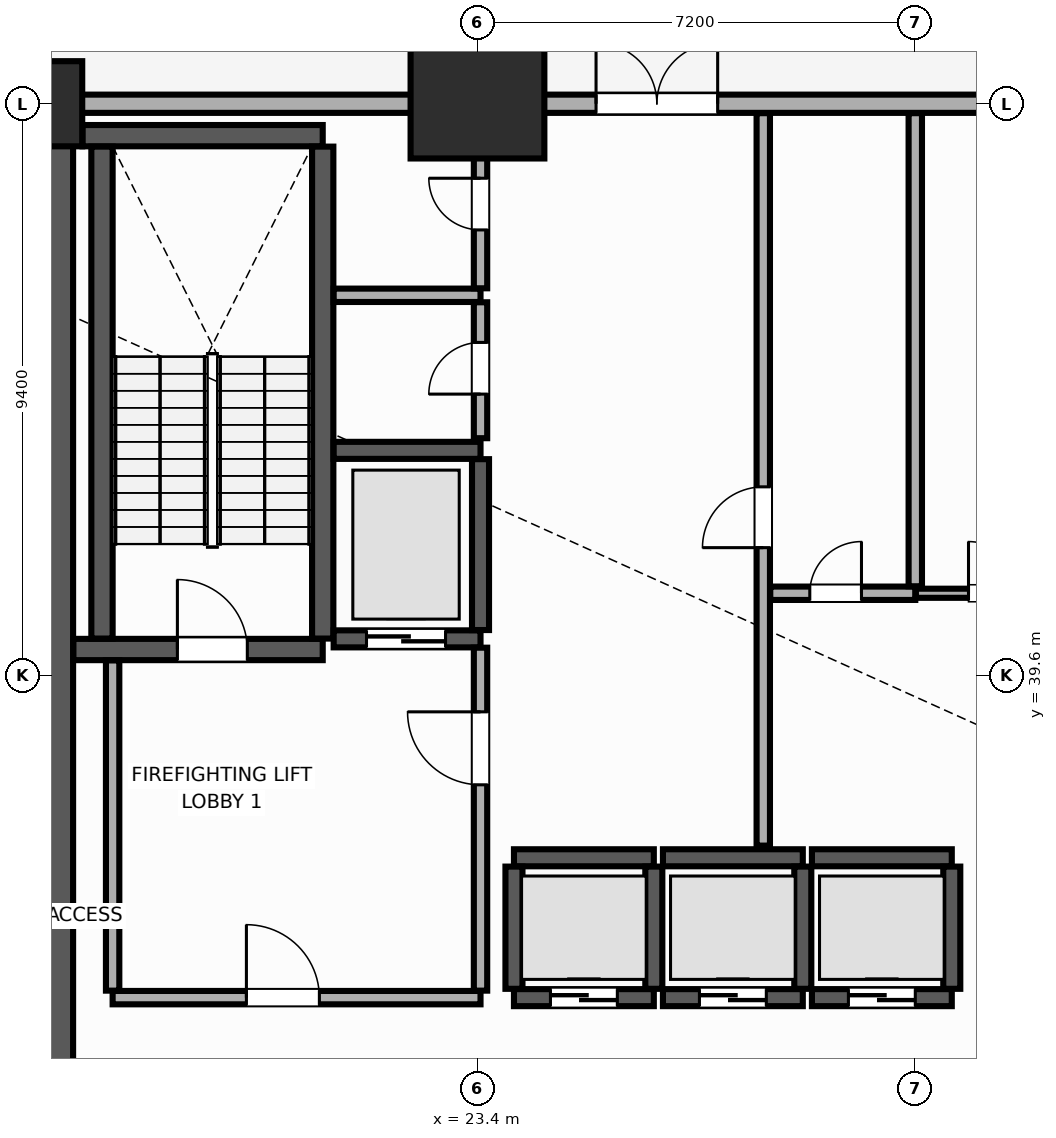
"""IFC4 building model, lengths in metres.
Left out: names, types, materials, properties, quantities, classifications, styles, units other than length and angle.
Written with IfcOpenShell. Run it as: python <this file> out.ifc"""

import sys

from ifc_helpers import new_model, si_unit, direction, frame, frame_2d, origin, origin_2d, place, context, subcontext, project, spatial, rectangle, extrude, element, fill, save


model = new_model("IFC4")
c1 = context("Model", 3, precision=1e-05, world=origin(), true_north=direction((0.0, 1.0)))
c2 = subcontext(c1, "Body", "Model", "MODEL_VIEW")
j1 = project(units=[si_unit("LENGTHUNIT", "METRE"), si_unit("PLANEANGLEUNIT", "RADIAN")], contexts=[c1])
p1 = place(None, origin())
s1 = spatial("IfcSite", under=j1, at=p1, CompositionType="ELEMENT")
p2 = place(p1, origin())
s2 = spatial("IfcBuilding", under=s1, at=p2, CompositionType="ELEMENT")
p3 = place(p2, origin())
s3 = spatial("IfcBuildingStorey", under=s2, at=p3, CompositionType="ELEMENT", Elevation=0.0)
p4 = place(p3, frame((23.4, 49.0, 0.0), z_axis=(0.0, 0.0, 1.0), x_axis=(1.0, 0.0, 0.0)))
e1 = element("IfcColumn", 1, at=p4, inside=s3, PredefinedType="USERDEFINED", context=c2, shape_type="SweptSolid", body=[
    extrude(rectangle(XDim=2.2, YDim=1.8, at=origin_2d()), origin(), (0.0, 0.0, 1.0), 7.68),
])
p5 = place(p3, frame((16.2, 49.0, 0.0), z_axis=(0.0, 0.0, 1.0), x_axis=(1.0, 0.0, 0.0)))
e2 = element("IfcColumn", 2, at=p5, inside=s3, PredefinedType="COLUMN", context=c2, shape_type="SweptSolid", body=[
    extrude(rectangle(XDim=1.4, YDim=1.4, at=origin_2d()), origin(), (0.0, 0.0, 1.0), 7.68),
])
p6 = place(p3, frame((73.5, 49.0, 0.0), z_axis=(0.0, 0.0, 1.0), x_axis=(-1.0, 0.0, 0.0)))
e3 = element("IfcWall", 3, at=p6, inside=s3, PredefinedType="SOLIDWALL", context=c2, shape_type="SweptSolid", body=[
    extrude(rectangle(XDim=63.0, YDim=0.3, at=frame_2d((31.5, 0.0))), origin(), (0.0, 0.0, 1.0), 5.4),
])
p7 = place(p6, frame((46.15, 0.0, 0.0)))
e4 = element("IfcOpeningElement", 4, at=p7, cuts=e3, PredefinedType="OPENING", context=c2, shape_type="SweptSolid", body=[
    extrude(rectangle(XDim=2.0, YDim=2.4, at=frame_2d((1.0, 1.2))), frame((0.0, 0.16, 0.0), z_axis=(0.0, -1.0, 0.0), x_axis=(1.0, 0.0, 0.0)), (0.0, 0.0, 1.0), 0.32),
])
p8 = place(p6, frame((37.6, 0.0, 0.0)))
e5 = element("IfcOpeningElement", 5, at=p8, cuts=e3, PredefinedType="OPENING", context=c2, shape_type="SweptSolid", body=[
    extrude(rectangle(XDim=2.0, YDim=2.4, at=frame_2d((1.0, 1.2))), frame((0.0, 0.16, 0.0), z_axis=(0.0, -1.0, 0.0), x_axis=(1.0, 0.0, 0.0)), (0.0, 0.0, 1.0), 0.32),
])
p9 = place(p6, frame((16.65, 0.0, 0.0)))
e6 = element("IfcOpeningElement", 6, at=p9, cuts=e3, PredefinedType="OPENING", context=c2, shape_type="SweptSolid", body=[
    extrude(rectangle(XDim=2.0, YDim=2.4, at=frame_2d((1.0, 1.2))), frame((0.0, 0.16, 0.0), z_axis=(0.0, -1.0, 0.0), x_axis=(1.0, 0.0, 0.0)), (0.0, 0.0, 1.0), 0.32),
])
p10 = place(p3, frame((16.2, 29.4, 0.0), z_axis=(0.0, 0.0, 1.0), x_axis=(0.0, 1.0, 0.0)))
e7 = element("IfcWall", 7, at=p10, inside=s3, PredefinedType="SHEAR", context=c2, shape_type="SweptSolid", body=[
    extrude(rectangle(XDim=19.2, YDim=1.1, at=frame_2d((9.6, 0.0))), origin(), (0.0, 0.0, 1.0), 7.68),
])
p11 = place(p3, frame((16.755, 40.025, 0.0), z_axis=(0.0, 0.0, 1.0), x_axis=(1.0, 0.0, 0.0)))
e8 = element("IfcWall", 8, at=p11, inside=s3, PredefinedType="SHEAR", context=c2, shape_type="SweptSolid", body=[
    extrude(rectangle(XDim=4.1, YDim=0.35, at=frame_2d((2.05, 0.0))), origin(), (0.0, 0.0, 1.0), 7.68),
])
p12 = place(p11, frame((1.71, 0.0, 0.0)))
e9 = element("IfcOpeningElement", 9, at=p12, cuts=e8, PredefinedType="OPENING", context=c2, shape_type="SweptSolid", body=[
    extrude(rectangle(XDim=1.15, YDim=2.15, at=frame_2d((0.575, 1.075))), frame((0.0, 0.185, 0.0), z_axis=(0.0, -1.0, 0.0), x_axis=(1.0, 0.0, 0.0)), (0.0, 0.0, 1.0), 0.37),
])
p13 = place(p3, frame((16.905, 48.475, 0.0), z_axis=(0.0, 0.0, 1.0), x_axis=(1.0, 0.0, 0.0)))
e10 = element("IfcWall", 10, at=p13, inside=s3, PredefinedType="SHEAR", context=c2, shape_type="SweptSolid", body=[
    extrude(rectangle(XDim=3.95, YDim=0.35, at=frame_2d((1.975, 0.0))), origin(), (0.0, 0.0, 1.0), 7.68),
])
for number, where, z_axis, x_axis in (
    (11, (17.225, 40.205, 0.0), (0.0, 0.0, 1.0), (0.0, 1.0, 0.0)),
    (12, (20.855, 40.205, 0.0), (0.0, 0.0, 1.0), (0.0, 1.0, 0.0)),
):
    element("IfcWall", number, at=place(p3, frame(where, z_axis=z_axis, x_axis=x_axis)), inside=s3, PredefinedType="SHEAR", context=c2, shape_type="SweptSolid", body=[
        extrude(rectangle(XDim=8.09, YDim=0.35, at=frame_2d((4.045, 0.0))), origin(), (0.0, 0.0, 1.0), 7.68),
    ])
p14 = place(p3, frame((24.0, 34.3, 0.0), z_axis=(0.0, 0.0, 1.0), x_axis=(1.0, 0.0, 0.0)))
e13 = element("IfcWall", 13, at=p14, inside=s3, PredefinedType="SHEAR", context=c2, shape_type="SweptSolid", body=[
    extrude(rectangle(XDim=2.3, YDim=0.28, at=frame_2d((1.15, 0.0))), origin(), (0.0, 0.0, 1.0), 7.68),
])
p15 = place(p14, frame((0.6, 0.0, 0.0)))
e14 = element("IfcOpeningElement", 14, at=p15, cuts=e13, PredefinedType="OPENING", context=c2, shape_type="SweptSolid", body=[
    extrude(rectangle(XDim=1.1, YDim=2.2, at=frame_2d((0.55, 1.1))), frame((0.0, 0.15, 0.0), z_axis=(0.0, -1.0, 0.0), x_axis=(1.0, 0.0, 0.0)), (0.0, 0.0, 1.0), 0.3),
])
p16 = place(p3, frame((24.0, 36.6, 0.0), z_axis=(0.0, 0.0, 1.0), x_axis=(1.0, 0.0, 0.0)))
e15 = element("IfcWall", 15, at=p16, inside=s3, PredefinedType="SHEAR", context=c2, shape_type="SweptSolid", body=[
    extrude(rectangle(XDim=2.3, YDim=0.28, at=frame_2d((1.15, 0.0))), origin(), (0.0, 0.0, 1.0), 7.68),
])
for number, where, z_axis, x_axis in (
    (16, (24.0, 34.445, 0.0), (0.0, 0.0, 1.0), (0.0, 1.0, 0.0)),
    (17, (26.3, 34.445, 0.0), (0.0, 0.0, 1.0), (0.0, 1.0, 0.0)),
):
    element("IfcWall", number, at=place(p3, frame(where, z_axis=z_axis, x_axis=x_axis)), inside=s3, PredefinedType="SHEAR", context=c2, shape_type="SweptSolid", body=[
        extrude(rectangle(XDim=2.01, YDim=0.28, at=frame_2d((1.005, 0.0))), origin(), (0.0, 0.0, 1.0), 7.68),
    ])
p17 = place(p3, frame((26.45, 34.3, 0.0), z_axis=(0.0, 0.0, 1.0), x_axis=(1.0, 0.0, 0.0)))
e18 = element("IfcWall", 18, at=p17, inside=s3, PredefinedType="SHEAR", context=c2, shape_type="SweptSolid", body=[
    extrude(rectangle(XDim=2.3, YDim=0.28, at=frame_2d((1.15, 0.0))), origin(), (0.0, 0.0, 1.0), 7.68),
])
p18 = place(p17, frame((0.6, 0.0, 0.0)))
e19 = element("IfcOpeningElement", 19, at=p18, cuts=e18, PredefinedType="OPENING", context=c2, shape_type="SweptSolid", body=[
    extrude(rectangle(XDim=1.1, YDim=2.2, at=frame_2d((0.55, 1.1))), frame((0.0, 0.15, 0.0), z_axis=(0.0, -1.0, 0.0), x_axis=(1.0, 0.0, 0.0)), (0.0, 0.0, 1.0), 0.3),
])
p19 = place(p3, frame((26.45, 36.6, 0.0), z_axis=(0.0, 0.0, 1.0), x_axis=(1.0, 0.0, 0.0)))
e20 = element("IfcWall", 20, at=p19, inside=s3, PredefinedType="SHEAR", context=c2, shape_type="SweptSolid", body=[
    extrude(rectangle(XDim=2.3, YDim=0.28, at=frame_2d((1.15, 0.0))), origin(), (0.0, 0.0, 1.0), 7.68),
])
p20 = place(p3, frame((28.75, 34.445, 0.0), z_axis=(0.0, 0.0, 1.0), x_axis=(0.0, 1.0, 0.0)))
e21 = element("IfcWall", 21, at=p20, inside=s3, PredefinedType="SHEAR", context=c2, shape_type="SweptSolid", body=[
    extrude(rectangle(XDim=2.01, YDim=0.28, at=frame_2d((1.005, 0.0))), origin(), (0.0, 0.0, 1.0), 7.68),
])
p21 = place(p3, frame((28.9, 34.3, 0.0), z_axis=(0.0, 0.0, 1.0), x_axis=(1.0, 0.0, 0.0)))
e22 = element("IfcWall", 22, at=p21, inside=s3, PredefinedType="SHEAR", context=c2, shape_type="SweptSolid", body=[
    extrude(rectangle(XDim=2.3, YDim=0.28, at=frame_2d((1.15, 0.0))), origin(), (0.0, 0.0, 1.0), 7.68),
])
p22 = place(p21, frame((0.6, 0.0, 0.0)))
e23 = element("IfcOpeningElement", 23, at=p22, cuts=e22, PredefinedType="OPENING", context=c2, shape_type="SweptSolid", body=[
    extrude(rectangle(XDim=1.1, YDim=2.2, at=frame_2d((0.55, 1.1))), frame((0.0, 0.15, 0.0), z_axis=(0.0, -1.0, 0.0), x_axis=(1.0, 0.0, 0.0)), (0.0, 0.0, 1.0), 0.3),
])
p23 = place(p3, frame((28.9, 36.6, 0.0), z_axis=(0.0, 0.0, 1.0), x_axis=(1.0, 0.0, 0.0)))
e24 = element("IfcWall", 24, at=p23, inside=s3, PredefinedType="SHEAR", context=c2, shape_type="SweptSolid", body=[
    extrude(rectangle(XDim=2.3, YDim=0.28, at=frame_2d((1.15, 0.0))), origin(), (0.0, 0.0, 1.0), 7.68),
])
p24 = place(p3, frame((31.2, 34.445, 0.0), z_axis=(0.0, 0.0, 1.0), x_axis=(0.0, 1.0, 0.0)))
e25 = element("IfcWall", 25, at=p24, inside=s3, PredefinedType="SHEAR", context=c2, shape_type="SweptSolid", body=[
    extrude(rectangle(XDim=2.01, YDim=0.28, at=frame_2d((1.005, 0.0))), origin(), (0.0, 0.0, 1.0), 7.68),
])
p25 = place(p3, frame((21.035, 40.2, 0.0), z_axis=(0.0, 0.0, 1.0), x_axis=(1.0, 0.0, 0.0)))
e26 = element("IfcWall", 26, at=p25, inside=s3, PredefinedType="SHEAR", context=c2, shape_type="SweptSolid", body=[
    extrude(rectangle(XDim=2.415, YDim=0.28, at=frame_2d((1.208, 0.0))), origin(), (0.0, 0.0, 1.0), 7.68),
])
p26 = place(p25, frame((0.54, 0.0, 0.0)))
e27 = element("IfcOpeningElement", 27, at=p26, cuts=e26, PredefinedType="OPENING", context=c2, shape_type="SweptSolid", body=[
    extrude(rectangle(XDim=1.3, YDim=2.3, at=frame_2d((0.65, 1.15))), frame((0.0, 0.15, 0.0), z_axis=(0.0, -1.0, 0.0), x_axis=(1.0, 0.0, 0.0)), (0.0, 0.0, 1.0), 0.3),
])
p27 = place(p3, frame((21.035, 43.3, 0.0), z_axis=(0.0, 0.0, 1.0), x_axis=(1.0, 0.0, 0.0)))
e28 = element("IfcWall", 28, at=p27, inside=s3, PredefinedType="SHEAR", context=c2, shape_type="SweptSolid", body=[
    extrude(rectangle(XDim=2.415, YDim=0.28, at=frame_2d((1.208, 0.0))), origin(), (0.0, 0.0, 1.0), 7.68),
])
p28 = place(p3, frame((23.45, 40.345, 0.0), z_axis=(0.0, 0.0, 1.0), x_axis=(0.0, 1.0, 0.0)))
e29 = element("IfcWall", 29, at=p28, inside=s3, PredefinedType="SHEAR", context=c2, shape_type="SweptSolid", body=[
    extrude(rectangle(XDim=2.81, YDim=0.28, at=frame_2d((1.405, 0.0))), origin(), (0.0, 0.0, 1.0), 7.68),
])
p29 = place(p3, frame((17.4, 34.3, 0.0), z_axis=(0.0, 0.0, 1.0), x_axis=(1.0, 0.0, 0.0)))
e30 = element("IfcWall", 30, at=p29, inside=s3, PredefinedType="PARTITIONING", context=c2, shape_type="SweptSolid", body=[
    extrude(rectangle(XDim=6.05, YDim=0.22, at=frame_2d((3.025, 0.0))), origin(), (0.0, 0.0, 1.0), 7.68),
])
p30 = place(p29, frame((2.2, 0.0, 0.0)))
e31 = element("IfcOpeningElement", 31, at=p30, cuts=e30, PredefinedType="OPENING", context=c2, shape_type="SweptSolid", body=[
    extrude(rectangle(XDim=1.2, YDim=2.15, at=frame_2d((0.6, 1.075))), frame((0.0, 0.12, 0.0), z_axis=(0.0, -1.0, 0.0), x_axis=(1.0, 0.0, 0.0)), (0.0, 0.0, 1.0), 0.24),
])
p31 = place(p3, frame((17.4, 34.415, 0.0), z_axis=(0.0, 0.0, 1.0), x_axis=(0.0, 1.0, 0.0)))
e32 = element("IfcWall", 32, at=p31, inside=s3, PredefinedType="PARTITIONING", context=c2, shape_type="SweptSolid", body=[
    extrude(rectangle(XDim=5.43, YDim=0.22, at=frame_2d((2.715, 0.0))), origin(), (0.0, 0.0, 1.0), 7.68),
])
p32 = place(p3, frame((23.45, 34.415, 0.0), z_axis=(0.0, 0.0, 1.0), x_axis=(0.0, 1.0, 0.0)))
e33 = element("IfcWall", 33, at=p32, inside=s3, PredefinedType="PARTITIONING", context=c2, shape_type="SweptSolid", body=[
    extrude(rectangle(XDim=5.64, YDim=0.22, at=frame_2d((2.82, 0.0))), origin(), (0.0, 0.0, 1.0), 7.68),
])
p33 = place(p32, frame((3.385, 0.0, 0.0)))
e34 = element("IfcOpeningElement", 34, at=p33, cuts=e33, PredefinedType="OPENING", context=c2, shape_type="SweptSolid", body=[
    extrude(rectangle(XDim=1.2, YDim=2.15, at=frame_2d((0.6, 1.075))), frame((0.0, 0.12, 0.0), z_axis=(0.0, -1.0, 0.0), x_axis=(1.0, 0.0, 0.0)), (0.0, 0.0, 1.0), 0.24),
])
p34 = place(p3, frame((21.035, 45.85, 0.0), z_axis=(0.0, 0.0, 1.0), x_axis=(1.0, 0.0, 0.0)))
e35 = element("IfcWall", 35, at=p34, inside=s3, PredefinedType="PARTITIONING", context=c2, shape_type="SweptSolid", body=[
    extrude(rectangle(XDim=2.415, YDim=0.22, at=frame_2d((1.208, 0.0))), origin(), (0.0, 0.0, 1.0), 7.68),
])
p35 = place(p3, frame((23.45, 43.5, 0.0), z_axis=(0.0, 0.0, 1.0), x_axis=(0.0, 1.0, 0.0)))
e36 = element("IfcWall", 36, at=p35, inside=s3, PredefinedType="PARTITIONING", context=c2, shape_type="SweptSolid", body=[
    extrude(rectangle(XDim=2.235, YDim=0.22, at=frame_2d((1.118, 0.0))), origin(), (0.0, 0.0, 1.0), 7.68),
])
p36 = place(p35, frame((0.725, 0.0, 0.0)))
e37 = element("IfcOpeningElement", 37, at=p36, cuts=e36, PredefinedType="OPENING", context=c2, shape_type="SweptSolid", body=[
    extrude(rectangle(XDim=0.85, YDim=2.1, at=frame_2d((0.425, 1.05))), frame((0.0, 0.12, 0.0), z_axis=(0.0, -1.0, 0.0), x_axis=(1.0, 0.0, 0.0)), (0.0, 0.0, 1.0), 0.24),
])
p37 = place(p3, frame((23.45, 45.965, 0.0), z_axis=(0.0, 0.0, 1.0), x_axis=(0.0, 1.0, 0.0)))
e38 = element("IfcWall", 38, at=p37, inside=s3, PredefinedType="PARTITIONING", context=c2, shape_type="SweptSolid", body=[
    extrude(rectangle(XDim=2.88, YDim=0.22, at=frame_2d((1.44, 0.0))), origin(), (0.0, 0.0, 1.0), 7.68),
])
p38 = place(p37, frame((0.96, 0.0, 0.0)))
e39 = element("IfcOpeningElement", 39, at=p38, cuts=e38, PredefinedType="OPENING", context=c2, shape_type="SweptSolid", body=[
    extrude(rectangle(XDim=0.85, YDim=2.1, at=frame_2d((0.425, 1.05))), frame((0.0, 0.12, 0.0), z_axis=(0.0, -1.0, 0.0), x_axis=(1.0, 0.0, 0.0)), (0.0, 0.0, 1.0), 0.24),
])
p39 = place(p3, frame((28.1, 36.8, 0.0), z_axis=(0.0, 0.0, 1.0), x_axis=(0.0, 1.0, 0.0)))
e40 = element("IfcWall", 40, at=p39, inside=s3, PredefinedType="PARTITIONING", context=c2, shape_type="SweptSolid", body=[
    extrude(rectangle(XDim=12.045, YDim=0.22, at=frame_2d((6.022, 0.0))), origin(), (0.0, 0.0, 1.0), 7.68),
])
p40 = place(p39, frame((4.9, 0.0, 0.0)))
e41 = element("IfcOpeningElement", 41, at=p40, cuts=e40, PredefinedType="OPENING", context=c2, shape_type="SweptSolid", body=[
    extrude(rectangle(XDim=1.0, YDim=2.15, at=frame_2d((0.5, 1.075))), frame((0.0, 0.12, 0.0), z_axis=(0.0, -1.0, 0.0), x_axis=(1.0, 0.0, 0.0)), (0.0, 0.0, 1.0), 0.24),
])
p41 = place(p3, frame((28.215, 40.95, 0.0), z_axis=(0.0, 0.0, 1.0), x_axis=(1.0, 0.0, 0.0)))
e42 = element("IfcWall", 42, at=p41, inside=s3, PredefinedType="PARTITIONING", context=c2, shape_type="SweptSolid", body=[
    extrude(rectangle(XDim=2.385, YDim=0.22, at=frame_2d((1.192, 0.0))), origin(), (0.0, 0.0, 1.0), 7.68),
])
p42 = place(p41, frame((0.65, 0.0, 0.0)))
e43 = element("IfcOpeningElement", 43, at=p42, cuts=e42, PredefinedType="OPENING", context=c2, shape_type="SweptSolid", body=[
    extrude(rectangle(XDim=0.85, YDim=2.1, at=frame_2d((0.425, 1.05))), frame((0.0, 0.12, 0.0), z_axis=(0.0, -1.0, 0.0), x_axis=(1.0, 0.0, 0.0)), (0.0, 0.0, 1.0), 0.24),
])
p43 = place(p3, frame((30.6, 41.065, 0.0), z_axis=(0.0, 0.0, 1.0), x_axis=(0.0, 1.0, 0.0)))
e44 = element("IfcWall", 44, at=p43, inside=s3, PredefinedType="PARTITIONING", context=c2, shape_type="SweptSolid", body=[
    extrude(rectangle(XDim=7.78, YDim=0.22, at=frame_2d((3.89, 0.0))), origin(), (0.0, 0.0, 1.0), 7.68),
])
p44 = place(p3, frame((30.61, 40.95, 0.0), z_axis=(0.0, 0.0, 1.0), x_axis=(1.0, 0.0, 0.0)))
e45 = element("IfcWall", 45, at=p44, inside=s3, PredefinedType="PARTITIONING", context=c2, shape_type="SweptSolid", body=[
    extrude(rectangle(XDim=2.59, YDim=0.15, at=frame_2d((1.295, 0.0))), origin(), (0.0, 0.0, 1.0), 7.68),
])
p45 = place(p44, frame((0.865, 0.0, 0.0)))
e46 = element("IfcOpeningElement", 46, at=p45, cuts=e45, PredefinedType="OPENING", context=c2, shape_type="SweptSolid", body=[
    extrude(rectangle(XDim=0.85, YDim=2.1, at=frame_2d((0.425, 1.05))), frame((0.0, 0.085, 0.0), z_axis=(0.0, -1.0, 0.0), x_axis=(1.0, 0.0, 0.0)), (0.0, 0.0, 1.0), 0.17),
])
p46 = place(p12, origin())
e47 = element("IfcDoor", 47, at=p46, inside=s3, OperationType="SINGLE_SWING_LEFT", PredefinedType="DOOR", context=c2, shape_type="SweptSolid", body=[
    extrude(rectangle(XDim=1.15, YDim=2.15, at=frame_2d((0.575, 1.075))), frame((0.0, 0.025, 0.0), z_axis=(0.0, -1.0, 0.0), x_axis=(1.0, 0.0, 0.0)), (0.0, 0.0, 1.0), 0.05),
])
fill(e9, e47)
p47 = place(p15, origin())
e48 = element("IfcDoor", 48, at=p47, inside=s3, OperationType="DOUBLE_DOOR_SLIDING", PredefinedType="DOOR", context=c2, shape_type="SweptSolid", body=[
    extrude(rectangle(XDim=1.1, YDim=2.2, at=frame_2d((0.55, 1.1))), frame((0.0, 0.025, 0.0), z_axis=(0.0, -1.0, 0.0), x_axis=(1.0, 0.0, 0.0)), (0.0, 0.0, 1.0), 0.05),
])
fill(e14, e48)
p48 = place(p18, origin())
e49 = element("IfcDoor", 49, at=p48, inside=s3, OperationType="DOUBLE_DOOR_SLIDING", PredefinedType="DOOR", context=c2, shape_type="SweptSolid", body=[
    extrude(rectangle(XDim=1.1, YDim=2.2, at=frame_2d((0.55, 1.1))), frame((0.0, 0.025, 0.0), z_axis=(0.0, -1.0, 0.0), x_axis=(1.0, 0.0, 0.0)), (0.0, 0.0, 1.0), 0.05),
])
fill(e19, e49)
p49 = place(p22, origin())
e50 = element("IfcDoor", 50, at=p49, inside=s3, OperationType="DOUBLE_DOOR_SLIDING", PredefinedType="DOOR", context=c2, shape_type="SweptSolid", body=[
    extrude(rectangle(XDim=1.1, YDim=2.2, at=frame_2d((0.55, 1.1))), frame((0.0, 0.025, 0.0), z_axis=(0.0, -1.0, 0.0), x_axis=(1.0, 0.0, 0.0)), (0.0, 0.0, 1.0), 0.05),
])
fill(e23, e50)
p50 = place(p26, origin())
e51 = element("IfcDoor", 51, at=p50, inside=s3, OperationType="DOUBLE_DOOR_SLIDING", PredefinedType="DOOR", context=c2, shape_type="SweptSolid", body=[
    extrude(rectangle(XDim=1.3, YDim=2.3, at=frame_2d((0.65, 1.15))), frame((0.0, 0.025, 0.0), z_axis=(0.0, -1.0, 0.0), x_axis=(1.0, 0.0, 0.0)), (0.0, 0.0, 1.0), 0.05),
])
fill(e27, e51)
p51 = place(p30, origin())
e52 = element("IfcDoor", 52, at=p51, inside=s3, OperationType="SINGLE_SWING_LEFT", PredefinedType="DOOR", context=c2, shape_type="SweptSolid", body=[
    extrude(rectangle(XDim=1.2, YDim=2.15, at=frame_2d((0.6, 1.075))), frame((0.0, 0.025, 0.0), z_axis=(0.0, -1.0, 0.0), x_axis=(1.0, 0.0, 0.0)), (0.0, 0.0, 1.0), 0.05),
])
fill(e31, e52)
p52 = place(p36, origin())
e53 = element("IfcDoor", 53, at=p52, inside=s3, OperationType="SINGLE_SWING_LEFT", PredefinedType="DOOR", context=c2, shape_type="SweptSolid", body=[
    extrude(rectangle(XDim=0.85, YDim=2.1, at=frame_2d((0.425, 1.05))), frame((0.0, 0.025, 0.0), z_axis=(0.0, -1.0, 0.0), x_axis=(1.0, 0.0, 0.0)), (0.0, 0.0, 1.0), 0.05),
])
fill(e37, e53)
p53 = place(p38, origin())
e54 = element("IfcDoor", 54, at=p53, inside=s3, OperationType="SINGLE_SWING_RIGHT", PredefinedType="DOOR", context=c2, shape_type="SweptSolid", body=[
    extrude(rectangle(XDim=0.85, YDim=2.1, at=frame_2d((0.425, 1.05))), frame((0.0, 0.025, 0.0), z_axis=(0.0, -1.0, 0.0), x_axis=(1.0, 0.0, 0.0)), (0.0, 0.0, 1.0), 0.05),
])
fill(e39, e54)
p54 = place(p40, origin())
e55 = element("IfcDoor", 55, at=p54, inside=s3, OperationType="SINGLE_SWING_LEFT", PredefinedType="DOOR", context=c2, shape_type="SweptSolid", body=[
    extrude(rectangle(XDim=1.0, YDim=2.15, at=frame_2d((0.5, 1.075))), frame((0.0, 0.025, 0.0), z_axis=(0.0, -1.0, 0.0), x_axis=(1.0, 0.0, 0.0)), (0.0, 0.0, 1.0), 0.05),
])
fill(e41, e55)
p55 = place(p42, origin())
e56 = element("IfcDoor", 56, at=p55, inside=s3, OperationType="SINGLE_SWING_RIGHT", PredefinedType="DOOR", context=c2, shape_type="SweptSolid", body=[
    extrude(rectangle(XDim=0.85, YDim=2.1, at=frame_2d((0.425, 1.05))), frame((0.0, 0.025, 0.0), z_axis=(0.0, -1.0, 0.0), x_axis=(1.0, 0.0, 0.0)), (0.0, 0.0, 1.0), 0.05),
])
fill(e43, e56)
p56 = place(p45, origin())
e57 = element("IfcDoor", 57, at=p56, inside=s3, OperationType="SINGLE_SWING_LEFT", PredefinedType="DOOR", context=c2, shape_type="SweptSolid", body=[
    extrude(rectangle(XDim=0.85, YDim=2.1, at=frame_2d((0.425, 1.05))), frame((0.0, 0.025, 0.0), z_axis=(0.0, -1.0, 0.0), x_axis=(1.0, 0.0, 0.0)), (0.0, 0.0, 1.0), 0.05),
])
fill(e46, e57)
p57 = place(p33, origin())
e58 = element("IfcDoor", 58, at=p57, inside=s3, OperationType="SINGLE_SWING_RIGHT", PredefinedType="DOOR", context=c2, shape_type="SweptSolid", body=[
    extrude(rectangle(XDim=1.2, YDim=2.15, at=frame_2d((0.6, 1.075))), frame((0.0, 0.025, 0.0), z_axis=(0.0, -1.0, 0.0), x_axis=(1.0, 0.0, 0.0)), (0.0, 0.0, 1.0), 0.05),
])
fill(e34, e58)
p58 = place(p7, frame((2.0, 0.0, 0.0), z_axis=(0.0, 0.0, 1.0), x_axis=(-1.0, 0.0, 0.0)))
e59 = element("IfcDoor", 59, at=p58, inside=s3, OperationType="DOUBLE_DOOR_SINGLE_SWING", PredefinedType="DOOR", context=c2, shape_type="SweptSolid", body=[
    extrude(rectangle(XDim=2.0, YDim=2.4, at=frame_2d((1.0, 1.2))), frame((0.0, 0.025, 0.0), z_axis=(0.0, -1.0, 0.0), x_axis=(1.0, 0.0, 0.0)), (0.0, 0.0, 1.0), 0.05),
])
fill(e4, e59)
save(model, sys.argv[1])
